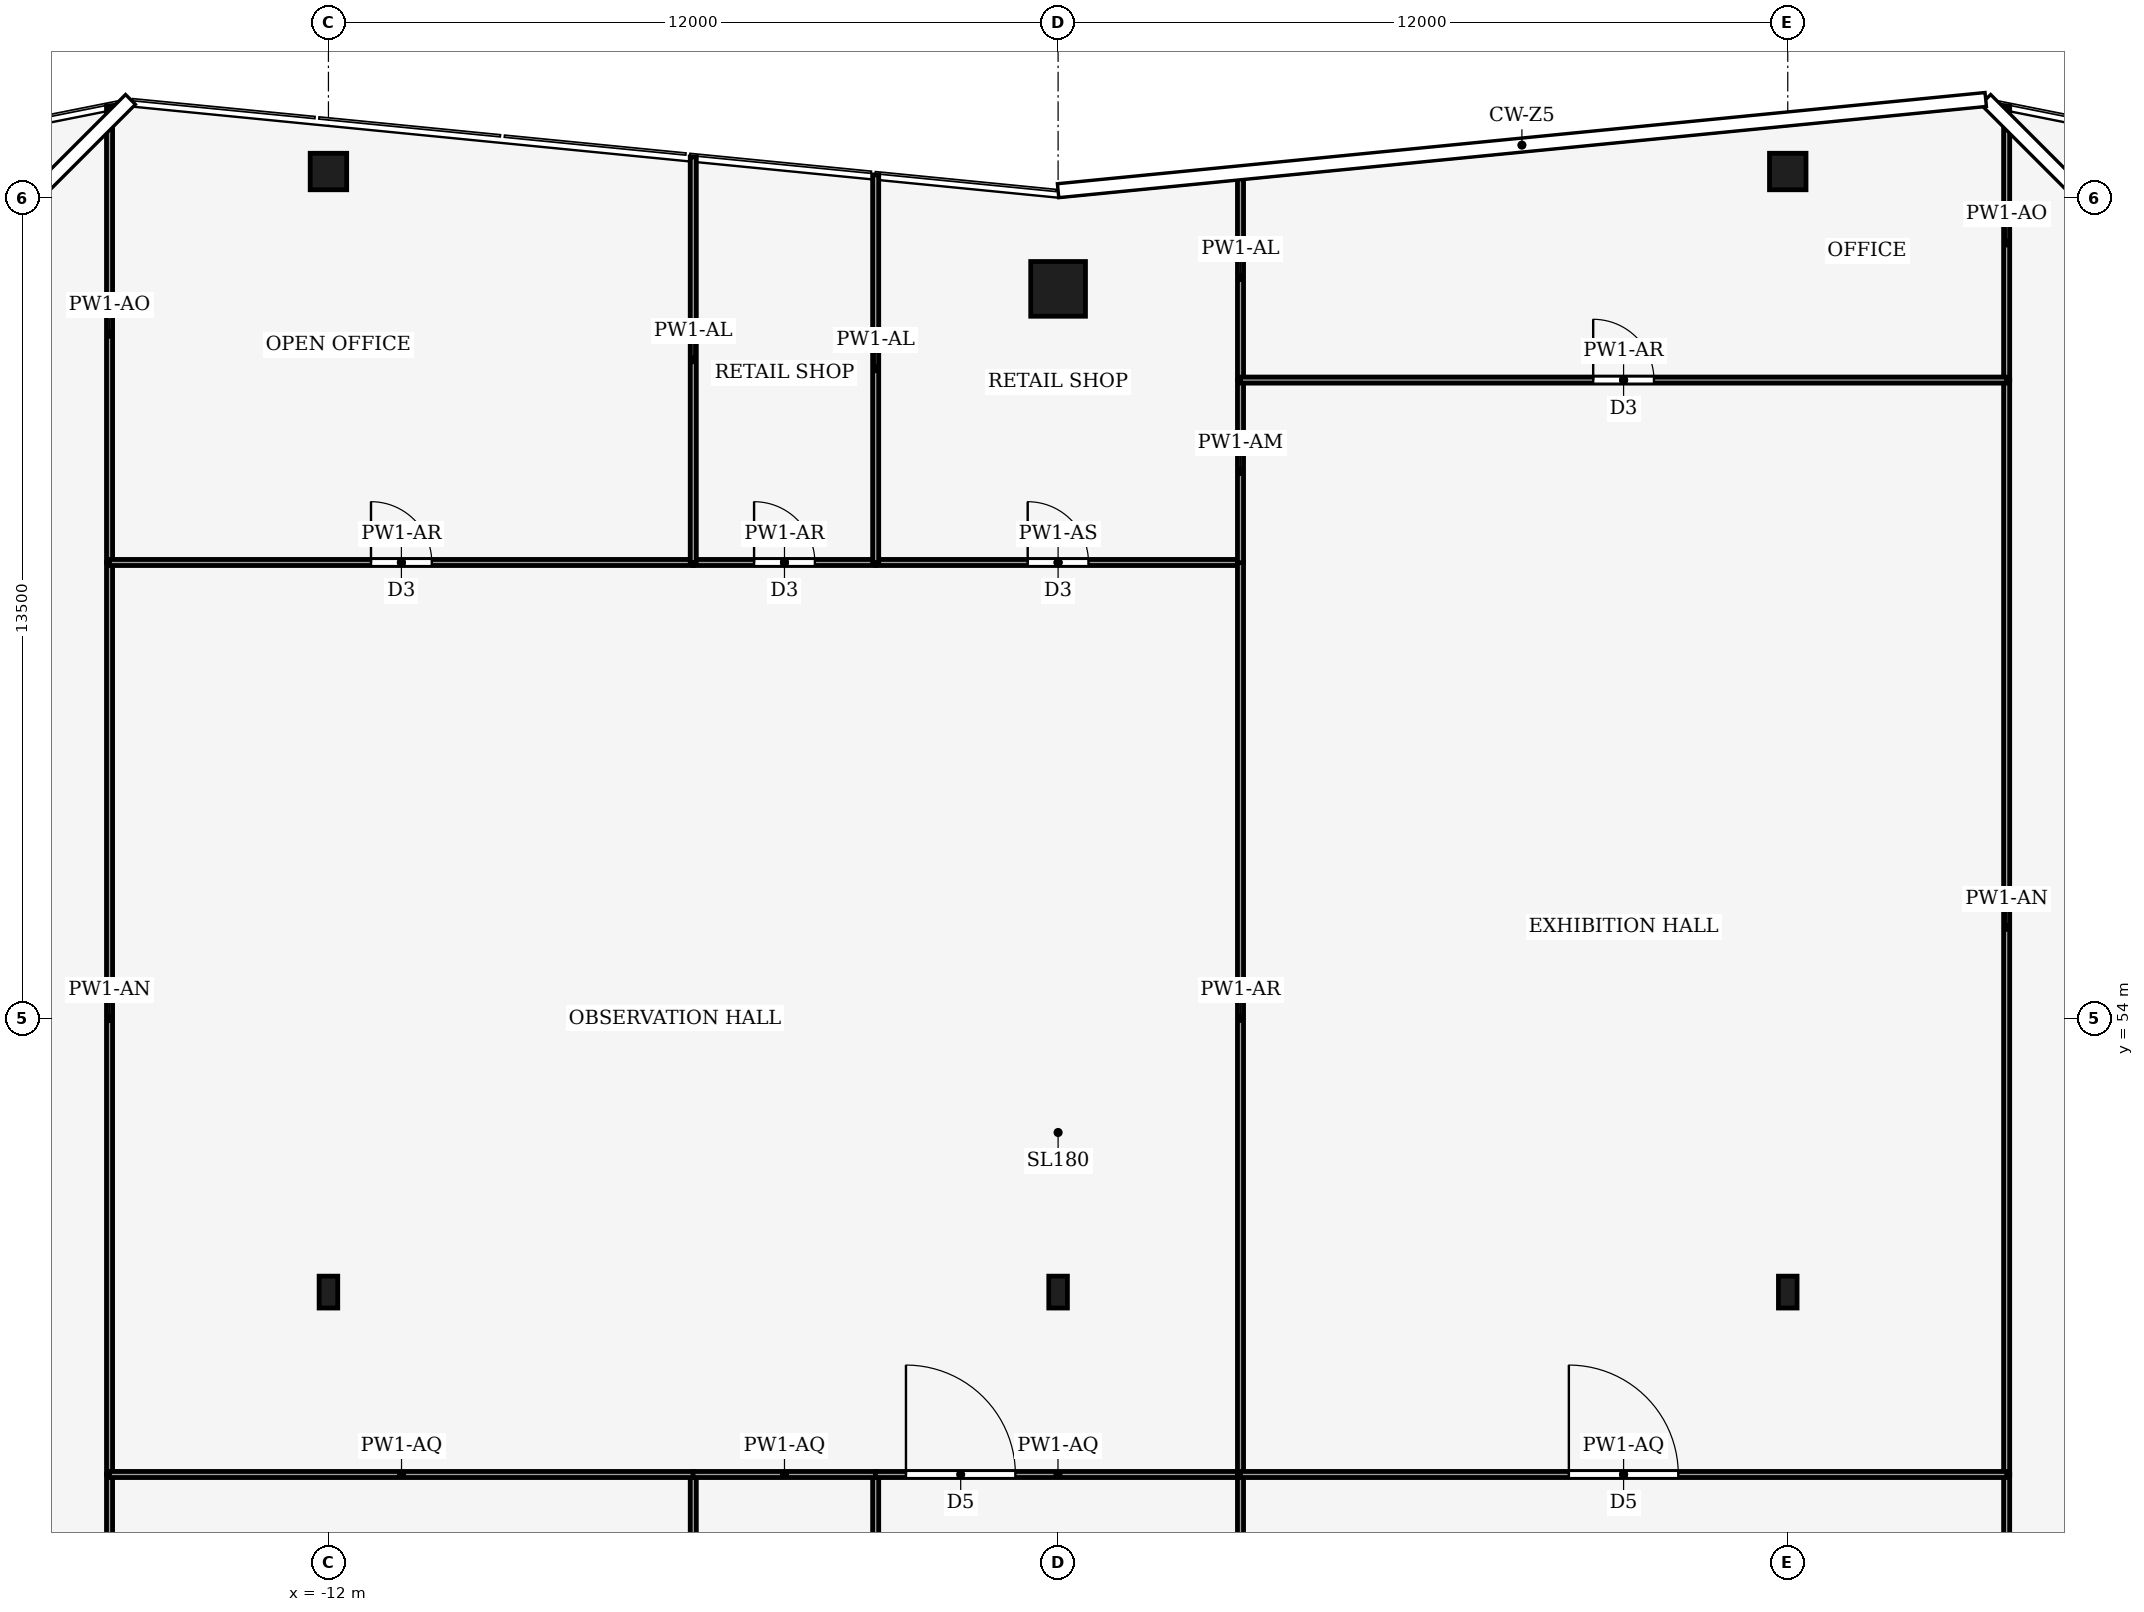
"""IFC4 building model, lengths in metres.
Left out: names, types, materials, properties, quantities, classifications, styles, units other than length and angle.
Written with IfcOpenShell. Run it as: python <this file> out.ifc"""

import sys

from ifc_helpers import new_model, si_unit, direction, frame, frame_2d, origin, origin_2d, place, context, subcontext, project, spatial, rectangle, hollow_rectangle, i_section, extrude, element, fill, save


model = new_model("IFC4")
c1 = context("Model", 3, precision=1e-05, world=origin(), true_north=direction((0.0, 1.0)))
c2 = subcontext(c1, "Body", "Model", "MODEL_VIEW")
j1 = project(units=[si_unit("LENGTHUNIT", "METRE"), si_unit("PLANEANGLEUNIT", "RADIAN")], contexts=[c1])
p1 = place(None, origin())
s1 = spatial("IfcSite", under=j1, at=p1, CompositionType="ELEMENT")
p2 = place(p1, origin())
s2 = spatial("IfcBuilding", under=s1, at=p2, CompositionType="ELEMENT")
p3 = place(p2, frame((0.0, 0.0, 334.0)))
s3 = spatial("IfcBuildingStorey", under=s2, at=p3, CompositionType="ELEMENT", Elevation=334.0)
p4 = place(p3, frame((0.0, 66.0, 0.0), z_axis=(0.0, 0.0, 1.0), x_axis=(1.0, 0.0, 0.0)))
e1 = element("IfcColumn", 1, at=p4, inside=s3, PredefinedType="COLUMN", context=c2, shape_type="SweptSolid", body=[
    extrude(hollow_rectangle(XDim=0.9, YDim=0.9, WallThickness=0.04, at=origin_2d()), origin(), (0.0, 0.0, 1.0), 6.5),
])
for number, where, z_axis, x_axis in (
    (2, (-12.0, 67.93, 0.0), (0.0, 0.0, 1.0), (1.0, 0.0, 0.0)),
    (3, (12.0, 67.93, 0.0), (0.0, 0.0, 1.0), (1.0, 0.0, 0.0)),
):
    element("IfcColumn", number, at=place(p3, frame(where, z_axis=z_axis, x_axis=x_axis)), inside=s3, PredefinedType="COLUMN", context=c2, shape_type="SweptSolid", body=[
        extrude(hollow_rectangle(XDim=0.6, YDim=0.6, WallThickness=0.025, at=origin_2d()), origin(), (0.0, 0.0, 1.0), 6.5),
    ])
for number, where, z_axis, x_axis in (
    (4, (-12.0, 49.5, 0.0), (0.0, 0.0, 1.0), (1.0, 0.0, 0.0)),
    (5, (0.0, 49.5, 0.0), (0.0, 0.0, 1.0), (1.0, 0.0, 0.0)),
    (6, (12.0, 49.5, 0.0), (0.0, 0.0, 1.0), (1.0, 0.0, 0.0)),
):
    element("IfcColumn", number, at=place(p3, frame(where, z_axis=z_axis, x_axis=x_axis)), inside=s3, PredefinedType="COLUMN", context=c2, shape_type="SweptSolid", body=[
        extrude(i_section(OverallWidth=0.306, OverallDepth=0.524, WebThickness=0.012, FlangeThickness=0.04, FilletRadius=0.027, at=origin_2d()), origin(), (0.0, 0.0, 1.0), 6.5),
    ])
p5 = place(p3, frame((-15.6, 40.6, 0.0), z_axis=(0.0, 0.0, 1.0), x_axis=(0.0, 1.0, 0.0)))
e7 = element("IfcWall", 7, at=p5, inside=s3, PredefinedType="PARTITIONING", context=c2, shape_type="SweptSolid", body=[
    extrude(rectangle(XDim=5.9, YDim=0.1, at=frame_2d((2.95, 0.0))), origin(), (0.0, 0.0, 1.0), 6.35),
])
p6 = place(p3, frame((-15.6, 46.5, 0.0), z_axis=(0.0, 0.0, 1.0), x_axis=(0.0, 1.0, 0.0)))
e8 = element("IfcWall", 8, at=p6, inside=s3, PredefinedType="PARTITIONING", context=c2, shape_type="SweptSolid", body=[
    extrude(rectangle(XDim=15.0, YDim=0.1, at=frame_2d((7.5, 0.0))), origin(), (0.0, 0.0, 1.0), 5.83),
])
p7 = place(p3, frame((-15.6, 61.5, 0.0), z_axis=(0.0, 0.0, 1.0), x_axis=(0.0, 1.0, 0.0)))
e9 = element("IfcWall", 9, at=p7, inside=s3, PredefinedType="PARTITIONING", context=c2, shape_type="SweptSolid", body=[
    extrude(rectangle(XDim=7.51, YDim=0.1, at=frame_2d((3.755, 0.0))), origin(), (0.0, 0.0, 1.0), 5.41),
])
p8 = place(p3, frame((15.6, 46.5, 0.0), z_axis=(0.0, 0.0, 1.0), x_axis=(0.0, -1.0, 0.0)))
e10 = element("IfcWall", 10, at=p8, inside=s3, PredefinedType="PARTITIONING", context=c2, shape_type="SweptSolid", body=[
    extrude(rectangle(XDim=5.9, YDim=0.1, at=frame_2d((2.95, 0.0))), origin(), (0.0, 0.0, 1.0), 6.35),
])
p9 = place(p3, frame((15.6, 64.5, 0.0), z_axis=(0.0, 0.0, 1.0), x_axis=(0.0, -1.0, 0.0)))
e11 = element("IfcWall", 11, at=p9, inside=s3, PredefinedType="PARTITIONING", context=c2, shape_type="SweptSolid", body=[
    extrude(rectangle(XDim=18.0, YDim=0.1, at=frame_2d((9.0, 0.0))), origin(), (0.0, 0.0, 1.0), 5.83),
])
p10 = place(p3, frame((15.6, 69.01, 0.0), z_axis=(0.0, 0.0, 1.0), x_axis=(0.0, -1.0, 0.0)))
e12 = element("IfcWall", 12, at=p10, inside=s3, PredefinedType="PARTITIONING", context=c2, shape_type="SweptSolid", body=[
    extrude(rectangle(XDim=4.51, YDim=0.1, at=frame_2d((2.255, 0.0))), origin(), (0.0, 0.0, 1.0), 5.41),
])
p11 = place(p3, frame((-6.0, 40.6, 0.0), z_axis=(0.0, 0.0, 1.0), x_axis=(0.0, 1.0, 0.0)))
e13 = element("IfcWall", 13, at=p11, inside=s3, PredefinedType="PARTITIONING", context=c2, shape_type="SweptSolid", body=[
    extrude(rectangle(XDim=5.9, YDim=0.1, at=frame_2d((2.95, 0.0))), origin(), (0.0, 0.0, 1.0), 6.35),
])
p12 = place(p3, frame((-5.996, 46.5, 0.0), z_axis=(0.0, 0.0, 1.0), x_axis=(-1.0, 0.0, 0.0)))
e14 = element("IfcWall", 14, at=p12, inside=s3, PredefinedType="PARTITIONING", context=c2, shape_type="SweptSolid", body=[
    extrude(rectangle(XDim=9.604, YDim=0.1, at=frame_2d((4.802, 0.0))), origin(), (0.0, 0.0, 1.0), 5.87),
])
p13 = place(p3, frame((-3.0, 40.6, 0.0), z_axis=(0.0, 0.0, 1.0), x_axis=(0.0, 1.0, 0.0)))
e15 = element("IfcWall", 15, at=p13, inside=s3, PredefinedType="PARTITIONING", context=c2, shape_type="SweptSolid", body=[
    extrude(rectangle(XDim=5.9, YDim=0.1, at=frame_2d((2.95, 0.0))), origin(), (0.0, 0.0, 1.0), 6.35),
])
p14 = place(p3, frame((-2.996, 46.5, 0.0), z_axis=(0.0, 0.0, 1.0), x_axis=(-1.0, 0.0, 0.0)))
e16 = element("IfcWall", 16, at=p14, inside=s3, PredefinedType="PARTITIONING", context=c2, shape_type="SweptSolid", body=[
    extrude(rectangle(XDim=3.008, YDim=0.1, at=frame_2d((1.504, 0.0))), origin(), (0.0, 0.0, 1.0), 5.87),
])
p15 = place(p3, frame((-3.004, 46.5, 0.0), z_axis=(0.0, 0.0, 1.0), x_axis=(1.0, 0.0, 0.0)))
e17 = element("IfcWall", 17, at=p15, inside=s3, PredefinedType="PARTITIONING", context=c2, shape_type="SweptSolid", body=[
    extrude(rectangle(XDim=6.004, YDim=0.1, at=frame_2d((3.002, 0.0))), origin(), (0.0, 0.0, 1.0), 5.87),
])
p16 = place(p15, frame((0.502, 0.0, 0.0)))
e18 = element("IfcOpeningElement", 18, at=p16, cuts=e17, PredefinedType="OPENING", context=c2, shape_type="SweptSolid", body=[
    extrude(rectangle(XDim=1.8, YDim=2.1, at=frame_2d((0.9, 1.05))), frame((0.0, 0.06, 0.0), z_axis=(0.0, -1.0, 0.0), x_axis=(1.0, 0.0, 0.0)), (0.0, 0.0, 1.0), 0.12),
])
p17 = place(p3, frame((3.0, 40.6, 0.0), z_axis=(0.0, 0.0, 1.0), x_axis=(0.0, 1.0, 0.0)))
e19 = element("IfcWall", 19, at=p17, inside=s3, PredefinedType="PARTITIONING", context=c2, shape_type="SweptSolid", body=[
    extrude(rectangle(XDim=5.9, YDim=0.1, at=frame_2d((2.95, 0.0))), origin(), (0.0, 0.0, 1.0), 6.35),
])
p18 = place(p3, frame((-15.6, 61.5, 0.0), z_axis=(0.0, 0.0, 1.0), x_axis=(1.0, 0.0, 0.0)))
e20 = element("IfcWall", 20, at=p18, inside=s3, PredefinedType="PARTITIONING", context=c2, shape_type="SweptSolid", body=[
    extrude(rectangle(XDim=9.6, YDim=0.1, at=frame_2d((4.8, 0.0))), origin(), (0.0, 0.0, 1.0), 5.72),
])
p19 = place(p18, frame((4.3, 0.0, 0.0)))
e21 = element("IfcOpeningElement", 21, at=p19, cuts=e20, PredefinedType="OPENING", context=c2, shape_type="SweptSolid", body=[
    extrude(rectangle(XDim=1.0, YDim=2.1, at=frame_2d((0.5, 1.05))), frame((0.0, 0.06, 0.0), z_axis=(0.0, -1.0, 0.0), x_axis=(1.0, 0.0, 0.0)), (0.0, 0.0, 1.0), 0.12),
])
p20 = place(p3, frame((-6.0, 61.5, 0.0), z_axis=(0.0, 0.0, 1.0), x_axis=(1.0, 0.0, 0.0)))
e22 = element("IfcWall", 22, at=p20, inside=s3, PredefinedType="PARTITIONING", context=c2, shape_type="SweptSolid", body=[
    extrude(rectangle(XDim=3.0, YDim=0.1, at=frame_2d((1.5, 0.0))), origin(), (0.0, 0.0, 1.0), 5.72),
])
p21 = place(p20, frame((1.0, 0.0, 0.0)))
e23 = element("IfcOpeningElement", 23, at=p21, cuts=e22, PredefinedType="OPENING", context=c2, shape_type="SweptSolid", body=[
    extrude(rectangle(XDim=1.0, YDim=2.1, at=frame_2d((0.5, 1.05))), frame((0.0, 0.06, 0.0), z_axis=(0.0, -1.0, 0.0), x_axis=(1.0, 0.0, 0.0)), (0.0, 0.0, 1.0), 0.12),
])
p22 = place(p3, frame((-3.0, 61.5, 0.0), z_axis=(0.0, 0.0, 1.0), x_axis=(1.0, 0.0, 0.0)))
e24 = element("IfcWall", 24, at=p22, inside=s3, PredefinedType="PARTITIONING", context=c2, shape_type="SweptSolid", body=[
    extrude(rectangle(XDim=6.0, YDim=0.1, at=frame_2d((3.0, 0.0))), origin(), (0.0, 0.0, 1.0), 5.77),
])
p23 = place(p22, frame((2.5, 0.0, 0.0)))
e25 = element("IfcOpeningElement", 25, at=p23, cuts=e24, PredefinedType="OPENING", context=c2, shape_type="SweptSolid", body=[
    extrude(rectangle(XDim=1.0, YDim=2.1, at=frame_2d((0.5, 1.05))), frame((0.0, 0.06, 0.0), z_axis=(0.0, -1.0, 0.0), x_axis=(1.0, 0.0, 0.0)), (0.0, 0.0, 1.0), 0.12),
])
p24 = place(p3, frame((3.0, 46.5, 0.0), z_axis=(0.0, 0.0, 1.0), x_axis=(0.0, 1.0, 0.0)))
e26 = element("IfcWall", 26, at=p24, inside=s3, PredefinedType="PARTITIONING", context=c2, shape_type="SweptSolid", body=[
    extrude(rectangle(XDim=15.004, YDim=0.1, at=frame_2d((7.502, 0.0))), origin(), (0.0, 0.0, 1.0), 5.72),
])
p25 = place(p3, frame((-6.0, 61.5, 0.0), z_axis=(0.0, 0.0, 1.0), x_axis=(0.0, 1.0, 0.0)))
e27 = element("IfcWall", 27, at=p25, inside=s3, PredefinedType="PARTITIONING", context=c2, shape_type="SweptSolid", body=[
    extrude(rectangle(XDim=6.67, YDim=0.1, at=frame_2d((3.335, 0.0))), origin(), (0.0, 0.0, 1.0), 5.52),
])
p26 = place(p3, frame((-3.0, 61.5, 0.0), z_axis=(0.0, 0.0, 1.0), x_axis=(0.0, 1.0, 0.0)))
e28 = element("IfcWall", 28, at=p26, inside=s3, PredefinedType="PARTITIONING", context=c2, shape_type="SweptSolid", body=[
    extrude(rectangle(XDim=6.375, YDim=0.1, at=frame_2d((3.188, 0.0))), origin(), (0.0, 0.0, 1.0), 5.52),
])
p27 = place(p3, frame((3.0, 61.496, 0.0), z_axis=(0.0, 0.0, 1.0), x_axis=(0.0, 1.0, 0.0)))
e29 = element("IfcWall", 29, at=p27, inside=s3, PredefinedType="PARTITIONING", context=c2, shape_type="SweptSolid", body=[
    extrude(rectangle(XDim=3.004, YDim=0.1, at=frame_2d((1.502, 0.0))), origin(), (0.0, 0.0, 1.0), 6.35),
])
p28 = place(p3, frame((3.0, 64.5, 0.0), z_axis=(0.0, 0.0, 1.0), x_axis=(0.0, 1.0, 0.0)))
e30 = element("IfcWall", 30, at=p28, inside=s3, PredefinedType="PARTITIONING", context=c2, shape_type="SweptSolid", body=[
    extrude(rectangle(XDim=3.375, YDim=0.1, at=frame_2d((1.688, 0.0))), origin(), (0.0, 0.0, 1.0), 5.52),
])
p29 = place(p3, frame((3.0, 46.5, 0.0), z_axis=(0.0, 0.0, 1.0), x_axis=(1.0, 0.0, 0.0)))
e31 = element("IfcWall", 31, at=p29, inside=s3, PredefinedType="PARTITIONING", context=c2, shape_type="SweptSolid", body=[
    extrude(rectangle(XDim=12.6, YDim=0.1, at=frame_2d((6.3, 0.0))), origin(), (0.0, 0.0, 1.0), 5.87),
])
p30 = place(p29, frame((5.4, 0.0, 0.0)))
e32 = element("IfcOpeningElement", 32, at=p30, cuts=e31, PredefinedType="OPENING", context=c2, shape_type="SweptSolid", body=[
    extrude(rectangle(XDim=1.8, YDim=2.1, at=frame_2d((0.9, 1.05))), frame((0.0, 0.06, 0.0), z_axis=(0.0, -1.0, 0.0), x_axis=(1.0, 0.0, 0.0)), (0.0, 0.0, 1.0), 0.12),
])
p31 = place(p3, frame((3.0, 64.5, 0.0), z_axis=(0.0, 0.0, 1.0), x_axis=(1.0, 0.0, 0.0)))
e33 = element("IfcWall", 33, at=p31, inside=s3, PredefinedType="PARTITIONING", context=c2, shape_type="SweptSolid", body=[
    extrude(rectangle(XDim=12.6, YDim=0.1, at=frame_2d((6.3, 0.0))), origin(), (0.0, 0.0, 1.0), 5.72),
])
p32 = place(p31, frame((5.8, 0.0, 0.0)))
e34 = element("IfcOpeningElement", 34, at=p32, cuts=e33, PredefinedType="OPENING", context=c2, shape_type="SweptSolid", body=[
    extrude(rectangle(XDim=1.0, YDim=2.1, at=frame_2d((0.5, 1.05))), frame((0.0, 0.06, 0.0), z_axis=(0.0, -1.0, 0.0), x_axis=(1.0, 0.0, 0.0)), (0.0, 0.0, 1.0), 0.12),
])
p33 = place(p16, origin())
e35 = element("IfcDoor", 35, at=p33, inside=s3, OperationType="DOUBLE_DOOR_SINGLE_SWING", PredefinedType="DOOR", context=c2, shape_type="SweptSolid", body=[
    extrude(rectangle(XDim=1.8, YDim=2.1, at=frame_2d((0.9, 1.05))), frame((0.0, 0.025, 0.0), z_axis=(0.0, -1.0, 0.0), x_axis=(1.0, 0.0, 0.0)), (0.0, 0.0, 1.0), 0.05),
])
fill(e18, e35)
p34 = place(p19, origin())
e36 = element("IfcDoor", 36, at=p34, inside=s3, OperationType="SINGLE_SWING_RIGHT", PredefinedType="DOOR", context=c2, shape_type="SweptSolid", body=[
    extrude(rectangle(XDim=1.0, YDim=2.1, at=frame_2d((0.5, 1.05))), frame((0.0, 0.025, 0.0), z_axis=(0.0, -1.0, 0.0), x_axis=(1.0, 0.0, 0.0)), (0.0, 0.0, 1.0), 0.05),
])
fill(e21, e36)
p35 = place(p21, origin())
e37 = element("IfcDoor", 37, at=p35, inside=s3, OperationType="SINGLE_SWING_LEFT", PredefinedType="DOOR", context=c2, shape_type="SweptSolid", body=[
    extrude(rectangle(XDim=1.0, YDim=2.1, at=frame_2d((0.5, 1.05))), frame((0.0, 0.025, 0.0), z_axis=(0.0, -1.0, 0.0), x_axis=(1.0, 0.0, 0.0)), (0.0, 0.0, 1.0), 0.05),
])
fill(e23, e37)
p36 = place(p23, origin())
e38 = element("IfcDoor", 38, at=p36, inside=s3, OperationType="SINGLE_SWING_RIGHT", PredefinedType="DOOR", context=c2, shape_type="SweptSolid", body=[
    extrude(rectangle(XDim=1.0, YDim=2.1, at=frame_2d((0.5, 1.05))), frame((0.0, 0.025, 0.0), z_axis=(0.0, -1.0, 0.0), x_axis=(1.0, 0.0, 0.0)), (0.0, 0.0, 1.0), 0.05),
])
fill(e25, e38)
p37 = place(p30, origin())
e39 = element("IfcDoor", 39, at=p37, inside=s3, OperationType="DOUBLE_DOOR_SINGLE_SWING", PredefinedType="DOOR", context=c2, shape_type="SweptSolid", body=[
    extrude(rectangle(XDim=1.8, YDim=2.1, at=frame_2d((0.9, 1.05))), frame((0.0, 0.025, 0.0), z_axis=(0.0, -1.0, 0.0), x_axis=(1.0, 0.0, 0.0)), (0.0, 0.0, 1.0), 0.05),
])
fill(e32, e39)
p38 = place(p32, origin())
e40 = element("IfcDoor", 40, at=p38, inside=s3, OperationType="SINGLE_SWING_RIGHT", PredefinedType="DOOR", context=c2, shape_type="SweptSolid", body=[
    extrude(rectangle(XDim=1.0, YDim=2.1, at=frame_2d((0.5, 1.05))), frame((0.0, 0.025, 0.0), z_axis=(0.0, -1.0, 0.0), x_axis=(1.0, 0.0, 0.0)), (0.0, 0.0, 1.0), 0.05),
])
fill(e34, e40)
save(model, sys.argv[1])
